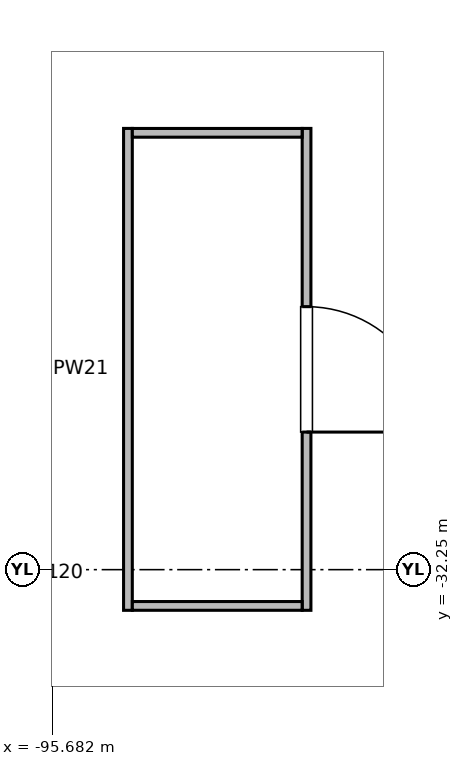
"""IFC4 building model, lengths in metres.
Left out: names, types, materials, properties, quantities, classifications, styles, units other than length and angle.
Written with IfcOpenShell. Run it as: python <this file> out.ifc"""

import sys

from ifc_helpers import new_model, si_unit, direction, frame, frame_2d, origin, place, context, subcontext, project, spatial, rectangle, extrude, element, fill, save


model = new_model("IFC4")
c1 = context("Model", 3, precision=1e-05, world=origin(), true_north=direction((0.0, 1.0)))
c2 = subcontext(c1, "Body", "Model", "MODEL_VIEW")
j1 = project(units=[si_unit("LENGTHUNIT", "METRE"), si_unit("PLANEANGLEUNIT", "RADIAN")], contexts=[c1])
p1 = place(None, origin())
s1 = spatial("IfcSite", under=j1, at=p1, CompositionType="ELEMENT")
p2 = place(p1, origin())
s2 = spatial("IfcBuilding", under=s1, at=p2, CompositionType="ELEMENT")
p3 = place(p2, frame((0.0, 0.0, 11.4)))
s3 = spatial("IfcBuildingStorey", under=s2, at=p3, CompositionType="ELEMENT", Elevation=11.4)
p4 = place(p3, frame((-92.333, -26.445, 0.0), z_axis=(0.0, 0.0, 1.0), x_axis=(0.0, -1.0, 0.0)))
e1 = element("IfcWall", 1, at=p4, inside=s3, PredefinedType="PARTITIONING", context=c2, shape_type="SweptSolid", body=[
    extrude(rectangle(XDim=6.34, YDim=0.115, at=frame_2d((3.17, 0.0))), origin(), (0.0, 0.0, 1.0), 3.82),
])
p5 = place(p4, frame((2.345, 0.0, 0.0)))
e2 = element("IfcOpeningElement", 2, at=p5, cuts=e1, PredefinedType="OPENING", context=c2, shape_type="SweptSolid", body=[
    extrude(rectangle(XDim=1.65, YDim=2.3, at=frame_2d((0.825, 1.15))), frame((0.0, 0.067, 0.0), z_axis=(0.0, -1.0, 0.0), x_axis=(1.0, 0.0, 0.0)), (0.0, 0.0, 1.0), 0.135),
])
p6 = place(p3, frame((-94.683, -32.785, 0.0), z_axis=(0.0, 0.0, 1.0), x_axis=(0.0, 1.0, 0.0)))
e3 = element("IfcWall", 3, at=p6, inside=s3, PredefinedType="PARTITIONING", context=c2, shape_type="SweptSolid", body=[
    extrude(rectangle(XDim=6.34, YDim=0.115, at=frame_2d((3.17, 0.0))), origin(), (0.0, 0.0, 1.0), 3.82),
])
for number, where, z_axis, x_axis in (
    (4, (-94.625, -32.727, 0.0), (0.0, 0.0, 1.0), (1.0, 0.0, 0.0)),
    (5, (-94.625, -26.503, 0.0), (0.0, 0.0, 1.0), (1.0, 0.0, 0.0)),
):
    element("IfcWall", number, at=place(p3, frame(where, z_axis=z_axis, x_axis=x_axis)), inside=s3, PredefinedType="PARTITIONING", context=c2, shape_type="SweptSolid", body=[
        extrude(rectangle(XDim=2.234, YDim=0.115, at=frame_2d((1.117, 0.0))), origin(), (0.0, 0.0, 1.0), 3.82),
    ])
p7 = place(p5, origin())
e6 = element("IfcDoor", 6, at=p7, inside=s3, OperationType="SINGLE_SWING_RIGHT", PredefinedType="DOOR", context=c2, shape_type="SweptSolid", body=[
    extrude(rectangle(XDim=1.65, YDim=2.3, at=frame_2d((0.825, 1.15))), frame((0.0, 0.025, 0.0), z_axis=(0.0, -1.0, 0.0), x_axis=(1.0, 0.0, 0.0)), (0.0, 0.0, 1.0), 0.05),
])
fill(e2, e6)
save(model, sys.argv[1])
